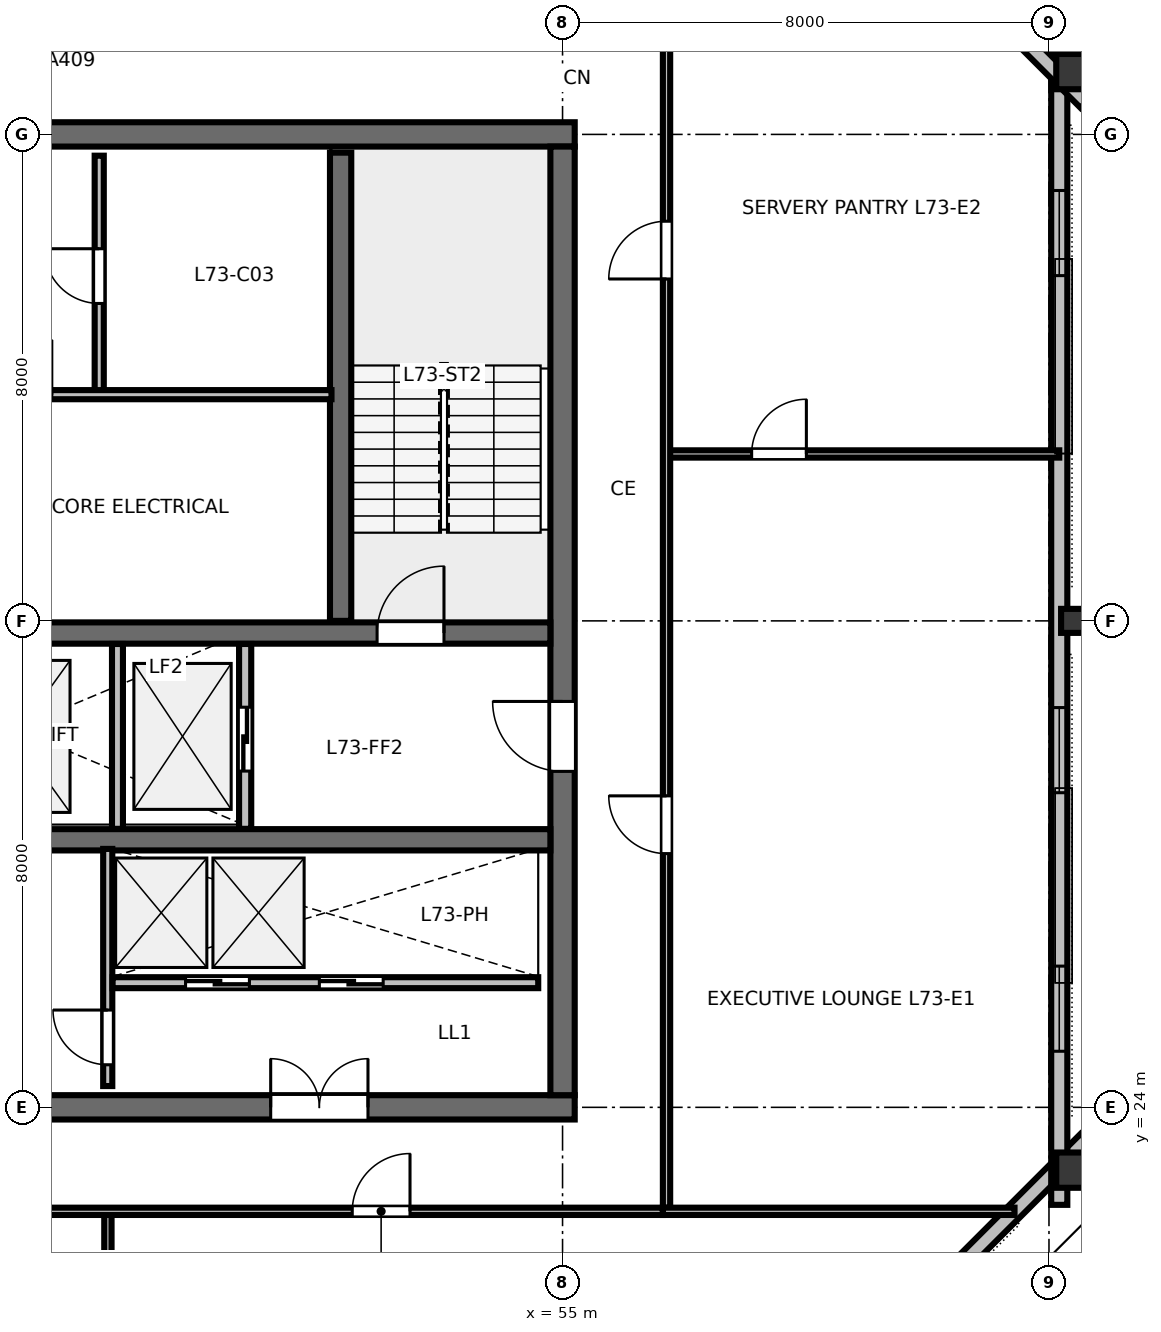
"""IFC4 building model, lengths in metres.
Left out: names, types, materials, properties, quantities, classifications, styles, units other than length and angle.
Written with IfcOpenShell. Run it as: python <this file> out.ifc"""

import sys

from ifc_helpers import new_model, si_unit, direction, frame, frame_2d, origin, origin_2d, place, context, subcontext, project, spatial, rectangle, hollow_rectangle, i_section, extrude, element, fill, save


model = new_model("IFC4")
c1 = context("Model", 3, precision=1e-05, world=origin(), true_north=direction((0.0, 1.0)))
c2 = subcontext(c1, "Body", "Model", "MODEL_VIEW")
j1 = project(units=[si_unit("LENGTHUNIT", "METRE"), si_unit("PLANEANGLEUNIT", "RADIAN")], contexts=[c1])
p1 = place(None, origin())
s1 = spatial("IfcSite", under=j1, at=p1, CompositionType="ELEMENT")
p2 = place(p1, origin())
s2 = spatial("IfcBuilding", under=s1, at=p2, CompositionType="ELEMENT")
p3 = place(p2, frame((0.0, 0.0, 275.4)))
s3 = spatial("IfcBuildingStorey", under=s2, at=p3, CompositionType="ELEMENT", Elevation=275.4)
p4 = place(p3, frame((36.8, 24.0, 0.0), z_axis=(0.0, 0.0, 1.0), x_axis=(1.0, 0.0, 0.0)))
e1 = element("IfcWall", 1, at=p4, inside=s3, PredefinedType="SHEAR", context=c2, shape_type="SweptSolid", body=[
    extrude(rectangle(XDim=18.4, YDim=0.4, at=frame_2d((9.2, 0.0))), origin(), (0.0, 0.0, 1.0), 3.28),
])
p5 = place(p4, frame((13.4, 0.0, 0.0)))
e2 = element("IfcOpeningElement", 2, at=p5, cuts=e1, PredefinedType="OPENING", context=c2, shape_type="SweptSolid", body=[
    extrude(rectangle(XDim=1.6, YDim=2.15, at=frame_2d((0.8, 1.075))), frame((0.0, 0.21, 0.0), z_axis=(0.0, -1.0, 0.0), x_axis=(1.0, 0.0, 0.0)), (0.0, 0.0, 1.0), 0.42),
])
p6 = place(p3, frame((36.8, 40.0, 0.0), z_axis=(0.0, 0.0, 1.0), x_axis=(1.0, 0.0, 0.0)))
e3 = element("IfcWall", 3, at=p6, inside=s3, PredefinedType="SHEAR", context=c2, shape_type="SweptSolid", body=[
    extrude(rectangle(XDim=18.4, YDim=0.4, at=frame_2d((9.2, 0.0))), origin(), (0.0, 0.0, 1.0), 3.28),
])
p7 = place(p6, frame((8.7, 0.0, 0.0)))
e4 = element("IfcOpeningElement", 4, at=p7, cuts=e3, PredefinedType="OPENING", context=c2, shape_type="SweptSolid", body=[
    extrude(rectangle(XDim=1.0, YDim=2.15, at=frame_2d((0.5, 1.075))), frame((0.0, 0.21, 0.0), z_axis=(0.0, -1.0, 0.0), x_axis=(1.0, 0.0, 0.0)), (0.0, 0.0, 1.0), 0.42),
])
p8 = place(p3, frame((55.0, 24.2, 0.0), z_axis=(0.0, 0.0, 1.0), x_axis=(0.0, 1.0, 0.0)))
e5 = element("IfcWall", 5, at=p8, inside=s3, PredefinedType="SHEAR", context=c2, shape_type="SweptSolid", body=[
    extrude(rectangle(XDim=15.6, YDim=0.4, at=frame_2d((7.8, 0.0))), origin(), (0.0, 0.0, 1.0), 3.28),
])
p9 = place(p8, frame((5.325, 0.0, 0.0)))
e6 = element("IfcOpeningElement", 6, at=p9, cuts=e5, PredefinedType="OPENING", context=c2, shape_type="SweptSolid", body=[
    extrude(rectangle(XDim=1.15, YDim=2.15, at=frame_2d((0.575, 1.075))), frame((0.0, 0.21, 0.0), z_axis=(0.0, -1.0, 0.0), x_axis=(1.0, 0.0, 0.0)), (0.0, 0.0, 1.0), 0.42),
])
p10 = place(p3, frame((37.2, 31.8, 0.0), z_axis=(0.0, 0.0, 1.0), x_axis=(1.0, 0.0, 0.0)))
e7 = element("IfcWall", 7, at=p10, inside=s3, PredefinedType="SHEAR", context=c2, shape_type="SweptSolid", body=[
    extrude(rectangle(XDim=17.6, YDim=0.35, at=frame_2d((8.8, 0.0))), origin(), (0.0, 0.0, 1.0), 3.28),
])
p11 = place(p10, frame((0.85, 0.0, 0.0)))
e8 = element("IfcOpeningElement", 8, at=p11, cuts=e7, PredefinedType="OPENING", context=c2, shape_type="SweptSolid", body=[
    extrude(rectangle(XDim=1.1, YDim=2.15, at=frame_2d((0.55, 1.075))), frame((0.0, 0.185, 0.0), z_axis=(0.0, -1.0, 0.0), x_axis=(1.0, 0.0, 0.0)), (0.0, 0.0, 1.0), 0.37),
])
p12 = place(p10, frame((14.75, 0.0, 0.0)))
e9 = element("IfcOpeningElement", 9, at=p12, cuts=e7, PredefinedType="OPENING", context=c2, shape_type="SweptSolid", body=[
    extrude(rectangle(XDim=1.1, YDim=2.15, at=frame_2d((0.55, 1.075))), frame((0.0, 0.185, 0.0), z_axis=(0.0, -1.0, 0.0), x_axis=(1.0, 0.0, 0.0)), (0.0, 0.0, 1.0), 0.37),
])
p13 = place(p3, frame((37.2, 28.4, 0.0), z_axis=(0.0, 0.0, 1.0), x_axis=(1.0, 0.0, 0.0)))
e10 = element("IfcWall", 10, at=p13, inside=s3, PredefinedType="SHEAR", context=c2, shape_type="SweptSolid", body=[
    extrude(rectangle(XDim=17.6, YDim=0.35, at=frame_2d((8.8, 0.0))), origin(), (0.0, 0.0, 1.0), 3.28),
])
p14 = place(p3, frame((63.469, 22.967, 0.0), z_axis=(-0.124526454344, 0.108785128068, 0.986234737818), x_axis=(0.742735851575, -0.648846987251, 0.165351268276)))
e11 = element("IfcColumn", 11, at=p14, inside=s3, PredefinedType="COLUMN", context=c2, shape_type="SweptSolid", body=[
    extrude(hollow_rectangle(XDim=0.58, YDim=0.7, WallThickness=0.032, at=origin_2d()), origin(), (0.0, 0.0, 1.0), 3.303),
])
p15 = place(p3, frame((63.389, 32.0, 0.0), z_axis=(-0.124611214962, 0.0, 0.99220564658), x_axis=(0.99220564658, 0.0, 0.124611214962)))
e12 = element("IfcColumn", 12, at=p15, inside=s3, PredefinedType="COLUMN", context=c2, shape_type="SweptSolid", body=[
    extrude(i_section(OverallWidth=0.395, OverallDepth=0.38, WebThickness=0.019, FlangeThickness=0.03, FilletRadius=0.025, at=origin_2d()), origin(), (0.0, 0.0, 1.0), 3.284),
])
p16 = place(p3, frame((63.469, 41.033, 0.0), z_axis=(-0.124526454344, -0.108785128068, 0.986234737818), x_axis=(0.742735851575, 0.648846987251, 0.165351268276)))
e13 = element("IfcColumn", 13, at=p16, inside=s3, PredefinedType="COLUMN", context=c2, shape_type="SweptSolid", body=[
    extrude(hollow_rectangle(XDim=0.58, YDim=0.7, WallThickness=0.032, at=origin_2d()), origin(), (0.0, 0.0, 1.0), 3.303),
])
p17 = place(p3, frame((55.747, 15.604, 0.0), z_axis=(0.0, 0.0, 1.0), x_axis=(0.707106781187, 0.707106781187, 0.0)))
e14 = element("IfcWall", 14, at=p17, inside=s3, PredefinedType="STANDARD", context=c2, shape_type="SweptSolid", body=[
    extrude(rectangle(XDim=11.125, YDim=0.265, at=frame_2d((5.562, 0.0))), origin(), (0.0, 0.0, 1.0), 2.717),
])
p18 = place(p3, frame((63.169, 22.396, 0.0), z_axis=(0.0, 0.0, 1.0), x_axis=(0.0, 1.0, 0.0)))
e15 = element("IfcWall", 15, at=p18, inside=s3, PredefinedType="STANDARD", context=c2, shape_type="SweptSolid", body=[
    extrude(rectangle(XDim=19.207, YDim=0.265, at=frame_2d((9.604, 0.0))), origin(), (0.0, 0.0, 1.0), 2.717),
])
p19 = place(p18, frame((2.526, 0.0, 0.85)))
e16 = element("IfcOpeningElement", 16, at=p19, cuts=e15, PredefinedType="OPENING", context=c2, shape_type="SweptSolid", body=[
    extrude(rectangle(XDim=1.4, YDim=1.2, at=frame_2d((0.7, 0.6))), frame((0.0, 0.142, 0.0), z_axis=(0.0, -1.0, 0.0), x_axis=(1.0, 0.0, 0.0)), (0.0, 0.0, 1.0), 0.285),
])
p20 = place(p18, frame((6.778, 0.0, 0.85)))
e17 = element("IfcOpeningElement", 17, at=p20, cuts=e15, PredefinedType="OPENING", context=c2, shape_type="SweptSolid", body=[
    extrude(rectangle(XDim=1.4, YDim=1.2, at=frame_2d((0.7, 0.6))), frame((0.0, 0.142, 0.0), z_axis=(0.0, -1.0, 0.0), x_axis=(1.0, 0.0, 0.0)), (0.0, 0.0, 1.0), 0.285),
])
p21 = place(p18, frame((15.281, 0.0, 0.85)))
e18 = element("IfcOpeningElement", 18, at=p21, cuts=e15, PredefinedType="OPENING", context=c2, shape_type="SweptSolid", body=[
    extrude(rectangle(XDim=1.4, YDim=1.2, at=frame_2d((0.7, 0.6))), frame((0.0, 0.142, 0.0), z_axis=(0.0, -1.0, 0.0), x_axis=(1.0, 0.0, 0.0)), (0.0, 0.0, 1.0), 0.285),
])
p22 = place(p3, frame((63.614, 40.529, 0.0), z_axis=(0.0, 0.0, 1.0), x_axis=(-0.707106781187, 0.707106781187, 0.0)))
e19 = element("IfcWall", 19, at=p22, inside=s3, PredefinedType="STANDARD", context=c2, shape_type="SweptSolid", body=[
    extrude(rectangle(XDim=11.125, YDim=0.265, at=frame_2d((5.562, 0.0))), origin(), (0.0, 0.0, 1.0), 2.717),
])
p23 = place(p3, frame((51.35, 32.0, 0.0), z_axis=(0.0, 0.0, 1.0), x_axis=(0.0, 1.0, 0.0)))
e20 = element("IfcWall", 20, at=p23, inside=s3, PredefinedType="SHEAR", context=c2, shape_type="SweptSolid", body=[
    extrude(rectangle(XDim=7.7, YDim=0.35, at=frame_2d((3.85, 0.0))), origin(), (0.0, 0.0, 1.0), 3.6),
])
p24 = place(p3, frame((47.38, 35.72, 0.0), z_axis=(0.0, 0.0, 1.0), x_axis=(0.0, 1.0, 0.0)))
e21 = element("IfcWall", 21, at=p24, inside=s3, PredefinedType="PARTITIONING", context=c2, shape_type="SweptSolid", body=[
    extrude(rectangle(XDim=3.93, YDim=0.15, at=frame_2d((1.965, 0.0))), origin(), (0.0, 0.0, 1.0), 3.26),
])
p25 = place(p24, frame((1.5, 0.0, 0.0)))
e22 = element("IfcOpeningElement", 22, at=p25, cuts=e21, PredefinedType="OPENING", context=c2, shape_type="SweptSolid", body=[
    extrude(rectangle(XDim=0.9, YDim=2.15, at=frame_2d((0.45, 1.075))), frame((0.0, 0.085, 0.0), z_axis=(0.0, -1.0, 0.0), x_axis=(1.0, 0.0, 0.0)), (0.0, 0.0, 1.0), 0.17),
])
p26 = place(p3, frame((40.8, 35.72, 0.0), z_axis=(0.0, 0.0, 1.0), x_axis=(1.0, 0.0, 0.0)))
e23 = element("IfcWall", 23, at=p26, inside=s3, PredefinedType="PARTITIONING", context=c2, shape_type="SweptSolid", body=[
    extrude(rectangle(XDim=10.4, YDim=0.15, at=frame_2d((5.2, 0.0))), origin(), (0.0, 0.0, 1.0), 3.26),
])
p27 = place(p26, frame((4.9, 0.0, 0.0)))
e24 = element("IfcOpeningElement", 24, at=p27, cuts=e23, PredefinedType="OPENING", context=c2, shape_type="SweptSolid", body=[
    extrude(rectangle(XDim=0.9, YDim=2.15, at=frame_2d((0.45, 1.075))), frame((0.0, 0.085, 0.0), z_axis=(0.0, -1.0, 0.0), x_axis=(1.0, 0.0, 0.0)), (0.0, 0.0, 1.0), 0.17),
])
p28 = place(p3, frame((49.78, 28.58, 0.0), z_axis=(0.0, 0.0, 1.0), x_axis=(0.0, 1.0, 0.0)))
e25 = element("IfcWall", 25, at=p28, inside=s3, PredefinedType="PARTITIONING", context=c2, shape_type="SweptSolid", body=[
    extrude(rectangle(XDim=3.04, YDim=0.2, at=frame_2d((1.52, 0.0))), origin(), (0.0, 0.0, 1.0), 3.26),
])
p29 = place(p28, frame((0.95, 0.0, 0.0)))
e26 = element("IfcOpeningElement", 26, at=p29, cuts=e25, PredefinedType="OPENING", context=c2, shape_type="SweptSolid", body=[
    extrude(rectangle(XDim=1.05, YDim=2.15, at=frame_2d((0.525, 1.075))), frame((0.0, 0.11, 0.0), z_axis=(0.0, -1.0, 0.0), x_axis=(1.0, 0.0, 0.0)), (0.0, 0.0, 1.0), 0.22),
])
p30 = place(p3, frame((47.68, 28.58, 0.0), z_axis=(0.0, 0.0, 1.0), x_axis=(0.0, 1.0, 0.0)))
e27 = element("IfcWall", 27, at=p30, inside=s3, PredefinedType="PARTITIONING", context=c2, shape_type="SweptSolid", body=[
    extrude(rectangle(XDim=3.04, YDim=0.18, at=frame_2d((1.52, 0.0))), origin(), (0.0, 0.0, 1.0), 3.26),
])
p31 = place(p3, frame((47.52, 24.35, 0.0), z_axis=(0.0, 0.0, 1.0), x_axis=(0.0, 1.0, 0.0)))
e28 = element("IfcWall", 28, at=p31, inside=s3, PredefinedType="PARTITIONING", context=c2, shape_type="SweptSolid", body=[
    extrude(rectangle(XDim=3.9, YDim=0.15, at=frame_2d((1.95, 0.0))), origin(), (0.0, 0.0, 1.0), 3.26),
])
p32 = place(p31, frame((0.35, 0.0, 0.0)))
e29 = element("IfcOpeningElement", 29, at=p32, cuts=e28, PredefinedType="OPENING", context=c2, shape_type="SweptSolid", body=[
    extrude(rectangle(XDim=0.9, YDim=2.15, at=frame_2d((0.45, 1.075))), frame((0.0, 0.085, 0.0), z_axis=(0.0, -1.0, 0.0), x_axis=(1.0, 0.0, 0.0)), (0.0, 0.0, 1.0), 0.17),
])
p33 = place(p3, frame((47.6, 26.05, 0.0), z_axis=(0.0, 0.0, 1.0), x_axis=(1.0, 0.0, 0.0)))
e30 = element("IfcWall", 30, at=p33, inside=s3, PredefinedType="PARTITIONING", context=c2, shape_type="SweptSolid", body=[
    extrude(rectangle(XDim=7.0, YDim=0.18, at=frame_2d((3.5, 0.0))), origin(), (0.0, 0.0, 1.0), 3.26),
])
p34 = place(p33, frame((1.2, 0.0, 0.0)))
e31 = element("IfcOpeningElement", 31, at=p34, cuts=e30, PredefinedType="OPENING", context=c2, shape_type="SweptSolid", body=[
    extrude(rectangle(XDim=1.05, YDim=2.15, at=frame_2d((0.525, 1.075))), frame((0.0, 0.1, 0.0), z_axis=(0.0, -1.0, 0.0), x_axis=(1.0, 0.0, 0.0)), (0.0, 0.0, 1.0), 0.2),
])
p35 = place(p33, frame((3.4, 0.0, 0.0)))
e32 = element("IfcOpeningElement", 32, at=p35, cuts=e30, PredefinedType="OPENING", context=c2, shape_type="SweptSolid", body=[
    extrude(rectangle(XDim=1.05, YDim=2.15, at=frame_2d((0.525, 1.075))), frame((0.0, 0.1, 0.0), z_axis=(0.0, -1.0, 0.0), x_axis=(1.0, 0.0, 0.0)), (0.0, 0.0, 1.0), 0.2),
])
p36 = place(p3, frame((47.523, 22.29, 0.0), z_axis=(0.0, 0.0, 1.0), x_axis=(0.0, -1.0, 0.0)))
e33 = element("IfcWall", 33, at=p36, inside=s3, PredefinedType="PARTITIONING", context=c2, shape_type="SweptSolid", body=[
    extrude(rectangle(XDim=6.241, YDim=0.12, at=frame_2d((3.121, 0.0))), origin(), (0.0, 0.0, 1.0), 2.54),
])
p37 = place(p36, frame((1.4, 0.0, 0.0)))
e34 = element("IfcOpeningElement", 34, at=p37, cuts=e33, PredefinedType="OPENING", context=c2, shape_type="SweptSolid", body=[
    extrude(rectangle(XDim=0.9, YDim=2.15, at=frame_2d((0.45, 1.075))), frame((0.0, 0.07, 0.0), z_axis=(0.0, -1.0, 0.0), x_axis=(1.0, 0.0, 0.0)), (0.0, 0.0, 1.0), 0.14),
])
p38 = place(p3, frame((35.35, 22.29, 0.0), z_axis=(0.0, 0.0, 1.0), x_axis=(1.0, 0.0, 0.0)))
e35 = element("IfcWall", 35, at=p38, inside=s3, PredefinedType="PARTITIONING", context=c2, shape_type="SweptSolid", body=[
    extrude(rectangle(XDim=21.3, YDim=0.12, at=frame_2d((10.65, 0.0))), origin(), (0.0, 0.0, 1.0), 2.54),
])
p39 = place(p38, frame((3.679, 0.0, 0.0)))
e36 = element("IfcOpeningElement", 36, at=p39, cuts=e35, PredefinedType="OPENING", context=c2, shape_type="SweptSolid", body=[
    extrude(rectangle(XDim=0.95, YDim=2.15, at=frame_2d((0.475, 1.075))), frame((0.0, 0.07, 0.0), z_axis=(0.0, -1.0, 0.0), x_axis=(1.0, 0.0, 0.0)), (0.0, 0.0, 1.0), 0.14),
])
p40 = place(p38, frame((16.191, 0.0, 0.0)))
e37 = element("IfcOpeningElement", 37, at=p40, cuts=e35, PredefinedType="OPENING", context=c2, shape_type="SweptSolid", body=[
    extrude(rectangle(XDim=0.95, YDim=2.15, at=frame_2d((0.475, 1.075))), frame((0.0, 0.07, 0.0), z_axis=(0.0, -1.0, 0.0), x_axis=(1.0, 0.0, 0.0)), (0.0, 0.0, 1.0), 0.14),
])
p41 = place(p3, frame((56.71, 34.745, 0.0), z_axis=(0.0, 0.0, 1.0), x_axis=(1.0, 0.0, 0.0)))
e38 = element("IfcWall", 38, at=p41, inside=s3, PredefinedType="PARTITIONING", context=c2, shape_type="SweptSolid", body=[
    extrude(rectangle(XDim=6.459, YDim=0.12, at=frame_2d((3.229, 0.0))), origin(), (0.0, 0.0, 1.0), 2.54),
])
p42 = place(p41, frame((1.4, 0.0, 0.0)))
e39 = element("IfcOpeningElement", 39, at=p42, cuts=e38, PredefinedType="OPENING", context=c2, shape_type="SweptSolid", body=[
    extrude(rectangle(XDim=0.9, YDim=2.15, at=frame_2d((0.45, 1.075))), frame((0.0, 0.07, 0.0), z_axis=(0.0, -1.0, 0.0), x_axis=(1.0, 0.0, 0.0)), (0.0, 0.0, 1.0), 0.14),
])
p43 = place(p3, frame((56.71, 22.35, 0.0), z_axis=(0.0, 0.0, 1.0), x_axis=(0.0, 1.0, 0.0)))
e40 = element("IfcWall", 40, at=p43, inside=s3, PredefinedType="PARTITIONING", context=c2, shape_type="SweptSolid", body=[
    extrude(rectangle(XDim=19.3, YDim=0.12, at=frame_2d((9.65, 0.0))), origin(), (0.0, 0.0, 1.0), 2.54),
])
p44 = place(p43, frame((5.823, 0.0, 0.0)))
e41 = element("IfcOpeningElement", 41, at=p44, cuts=e40, PredefinedType="OPENING", context=c2, shape_type="SweptSolid", body=[
    extrude(rectangle(XDim=0.95, YDim=2.15, at=frame_2d((0.475, 1.075))), frame((0.0, 0.07, 0.0), z_axis=(0.0, -1.0, 0.0), x_axis=(1.0, 0.0, 0.0)), (0.0, 0.0, 1.0), 0.14),
])
p45 = place(p43, frame((15.272, 0.0, 0.0)))
e42 = element("IfcOpeningElement", 42, at=p45, cuts=e40, PredefinedType="OPENING", context=c2, shape_type="SweptSolid", body=[
    extrude(rectangle(XDim=0.95, YDim=2.15, at=frame_2d((0.475, 1.075))), frame((0.0, 0.07, 0.0), z_axis=(0.0, -1.0, 0.0), x_axis=(1.0, 0.0, 0.0)), (0.0, 0.0, 1.0), 0.14),
])
p46 = place(p3, frame((56.65, 22.29, 0.0), z_axis=(0.0, 0.0, 1.0), x_axis=(1.0, 0.0, 0.0)))
e43 = element("IfcWall", 43, at=p46, inside=s3, PredefinedType="PARTITIONING", context=c2, shape_type="SweptSolid", body=[
    extrude(rectangle(XDim=5.783, YDim=0.12, at=frame_2d((2.892, 0.0))), origin(), (0.0, 0.0, 1.0), 2.54),
])
p47 = place(p19, origin())
e44 = element("IfcWindow", 44, at=p47, inside=s3, PartitioningType="SINGLE_PANEL", PredefinedType="WINDOW", context=c2, shape_type="SweptSolid", body=[
    extrude(rectangle(XDim=1.4, YDim=1.2, at=frame_2d((0.7, 0.6))), frame((0.0, 0.03, 0.0), z_axis=(0.0, -1.0, 0.0), x_axis=(1.0, 0.0, 0.0)), (0.0, 0.0, 1.0), 0.06),
])
fill(e16, e44)
p48 = place(p20, origin())
e45 = element("IfcWindow", 45, at=p48, inside=s3, PartitioningType="SINGLE_PANEL", PredefinedType="WINDOW", context=c2, shape_type="SweptSolid", body=[
    extrude(rectangle(XDim=1.4, YDim=1.2, at=frame_2d((0.7, 0.6))), frame((0.0, 0.03, 0.0), z_axis=(0.0, -1.0, 0.0), x_axis=(1.0, 0.0, 0.0)), (0.0, 0.0, 1.0), 0.06),
])
fill(e17, e45)
p49 = place(p21, origin())
e46 = element("IfcWindow", 46, at=p49, inside=s3, PartitioningType="SINGLE_PANEL", PredefinedType="WINDOW", context=c2, shape_type="SweptSolid", body=[
    extrude(rectangle(XDim=1.4, YDim=1.2, at=frame_2d((0.7, 0.6))), frame((0.0, 0.03, 0.0), z_axis=(0.0, -1.0, 0.0), x_axis=(1.0, 0.0, 0.0)), (0.0, 0.0, 1.0), 0.06),
])
fill(e18, e46)
p50 = place(p12, origin())
e47 = element("IfcDoor", 47, at=p50, inside=s3, OperationType="SINGLE_SWING_RIGHT", PredefinedType="DOOR", context=c2, shape_type="SweptSolid", body=[
    extrude(rectangle(XDim=1.1, YDim=2.15, at=frame_2d((0.55, 1.075))), frame((0.0, 0.025, 0.0), z_axis=(0.0, -1.0, 0.0), x_axis=(1.0, 0.0, 0.0)), (0.0, 0.0, 1.0), 0.05),
])
fill(e9, e47)
p51 = place(p9, origin())
e48 = element("IfcDoor", 48, at=p51, inside=s3, OperationType="SINGLE_SWING_RIGHT", PredefinedType="DOOR", context=c2, shape_type="SweptSolid", body=[
    extrude(rectangle(XDim=1.15, YDim=2.15, at=frame_2d((0.575, 1.075))), frame((0.0, 0.025, 0.0), z_axis=(0.0, -1.0, 0.0), x_axis=(1.0, 0.0, 0.0)), (0.0, 0.0, 1.0), 0.05),
])
fill(e6, e48)
p52 = place(p5, origin())
e49 = element("IfcDoor", 49, at=p52, inside=s3, OperationType="DOUBLE_DOOR_SINGLE_SWING", PredefinedType="DOOR", context=c2, shape_type="SweptSolid", body=[
    extrude(rectangle(XDim=1.6, YDim=2.15, at=frame_2d((0.8, 1.075))), frame((0.0, 0.025, 0.0), z_axis=(0.0, -1.0, 0.0), x_axis=(1.0, 0.0, 0.0)), (0.0, 0.0, 1.0), 0.05),
])
fill(e2, e49)
p53 = place(p25, origin())
e50 = element("IfcDoor", 50, at=p53, inside=s3, OperationType="SINGLE_SWING_RIGHT", PredefinedType="DOOR", context=c2, shape_type="SweptSolid", body=[
    extrude(rectangle(XDim=0.9, YDim=2.15, at=frame_2d((0.45, 1.075))), frame((0.0, 0.025, 0.0), z_axis=(0.0, -1.0, 0.0), x_axis=(1.0, 0.0, 0.0)), (0.0, 0.0, 1.0), 0.05),
])
fill(e22, e50)
p54 = place(p29, origin())
e51 = element("IfcDoor", 51, at=p54, inside=s3, OperationType="SLIDING_TO_RIGHT", PredefinedType="DOOR", context=c2, shape_type="SweptSolid", body=[
    extrude(rectangle(XDim=1.05, YDim=2.15, at=frame_2d((0.525, 1.075))), frame((0.0, 0.025, 0.0), z_axis=(0.0, -1.0, 0.0), x_axis=(1.0, 0.0, 0.0)), (0.0, 0.0, 1.0), 0.05),
])
fill(e26, e51)
p55 = place(p32, origin())
e52 = element("IfcDoor", 52, at=p55, inside=s3, OperationType="SINGLE_SWING_RIGHT", PredefinedType="DOOR", context=c2, shape_type="SweptSolid", body=[
    extrude(rectangle(XDim=0.9, YDim=2.15, at=frame_2d((0.45, 1.075))), frame((0.0, 0.025, 0.0), z_axis=(0.0, -1.0, 0.0), x_axis=(1.0, 0.0, 0.0)), (0.0, 0.0, 1.0), 0.05),
])
fill(e29, e52)
p56 = place(p34, origin())
e53 = element("IfcDoor", 53, at=p56, inside=s3, OperationType="SLIDING_TO_LEFT", PredefinedType="DOOR", context=c2, shape_type="SweptSolid", body=[
    extrude(rectangle(XDim=1.05, YDim=2.15, at=frame_2d((0.525, 1.075))), frame((0.0, 0.025, 0.0), z_axis=(0.0, -1.0, 0.0), x_axis=(1.0, 0.0, 0.0)), (0.0, 0.0, 1.0), 0.05),
])
fill(e31, e53)
p57 = place(p35, origin())
e54 = element("IfcDoor", 54, at=p57, inside=s3, OperationType="SLIDING_TO_RIGHT", PredefinedType="DOOR", context=c2, shape_type="SweptSolid", body=[
    extrude(rectangle(XDim=1.05, YDim=2.15, at=frame_2d((0.525, 1.075))), frame((0.0, 0.025, 0.0), z_axis=(0.0, -1.0, 0.0), x_axis=(1.0, 0.0, 0.0)), (0.0, 0.0, 1.0), 0.05),
])
fill(e32, e54)
p58 = place(p40, origin())
e55 = element("IfcDoor", 55, at=p58, inside=s3, OperationType="SINGLE_SWING_RIGHT", PredefinedType="DOOR", context=c2, shape_type="SweptSolid", body=[
    extrude(rectangle(XDim=0.95, YDim=2.15, at=frame_2d((0.475, 1.075))), frame((0.0, 0.025, 0.0), z_axis=(0.0, -1.0, 0.0), x_axis=(1.0, 0.0, 0.0)), (0.0, 0.0, 1.0), 0.05),
])
fill(e37, e55)
p59 = place(p42, origin())
e56 = element("IfcDoor", 56, at=p59, inside=s3, OperationType="SINGLE_SWING_RIGHT", PredefinedType="DOOR", context=c2, shape_type="SweptSolid", body=[
    extrude(rectangle(XDim=0.9, YDim=2.15, at=frame_2d((0.45, 1.075))), frame((0.0, 0.025, 0.0), z_axis=(0.0, -1.0, 0.0), x_axis=(1.0, 0.0, 0.0)), (0.0, 0.0, 1.0), 0.05),
])
fill(e39, e56)
p60 = place(p44, origin())
e57 = element("IfcDoor", 57, at=p60, inside=s3, OperationType="SINGLE_SWING_RIGHT", PredefinedType="DOOR", context=c2, shape_type="SweptSolid", body=[
    extrude(rectangle(XDim=0.95, YDim=2.15, at=frame_2d((0.475, 1.075))), frame((0.0, 0.025, 0.0), z_axis=(0.0, -1.0, 0.0), x_axis=(1.0, 0.0, 0.0)), (0.0, 0.0, 1.0), 0.05),
])
fill(e41, e57)
p61 = place(p45, origin())
e58 = element("IfcDoor", 58, at=p61, inside=s3, OperationType="SINGLE_SWING_LEFT", PredefinedType="DOOR", context=c2, shape_type="SweptSolid", body=[
    extrude(rectangle(XDim=0.95, YDim=2.15, at=frame_2d((0.475, 1.075))), frame((0.0, 0.025, 0.0), z_axis=(0.0, -1.0, 0.0), x_axis=(1.0, 0.0, 0.0)), (0.0, 0.0, 1.0), 0.05),
])
fill(e42, e58)
save(model, sys.argv[1])
